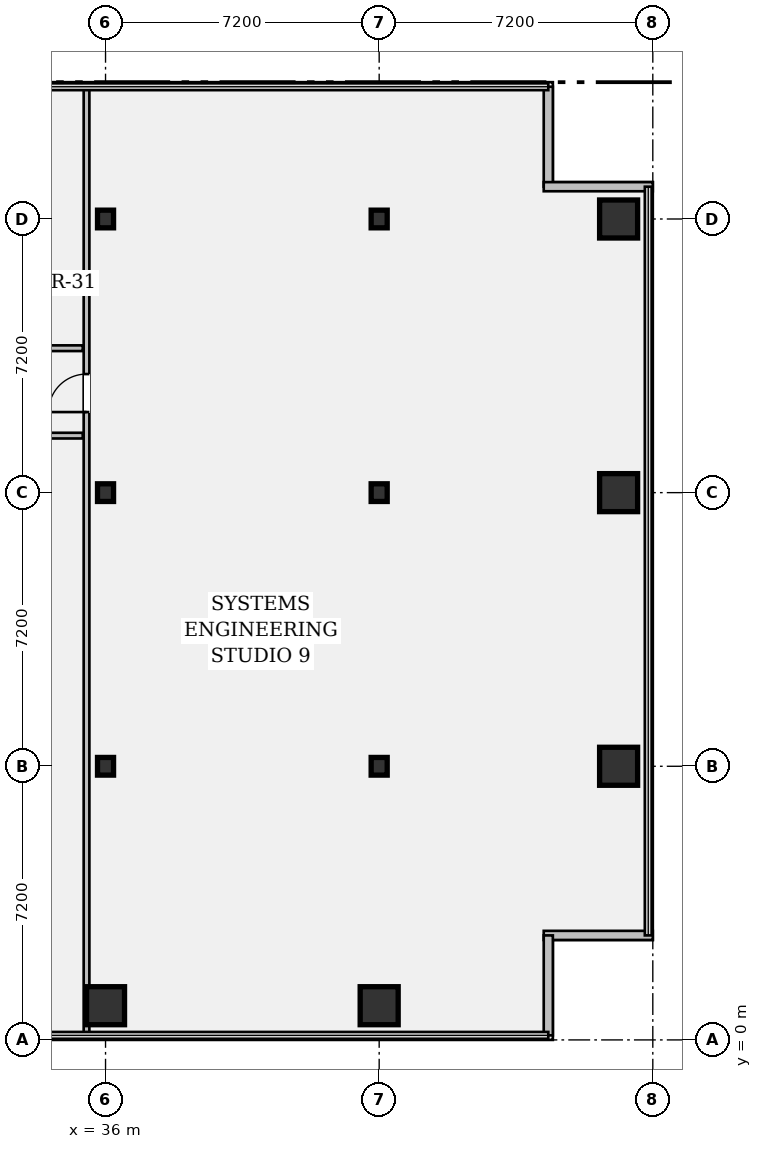
"""IFC4 building model, lengths in metres.
Left out: names, types, materials, properties, quantities, classifications, styles, units other than length and angle.
Written with IfcOpenShell. Run it as: python <this file> out.ifc"""

import sys

from ifc_helpers import new_model, si_unit, direction, frame, frame_2d, origin, origin_2d, place, context, subcontext, project, spatial, rectangle, hollow_rectangle, i_section, extrude, element, fill, save


model = new_model("IFC4")
c1 = context("Model", 3, precision=1e-05, world=origin(), true_north=direction((0.0, 1.0)))
c2 = subcontext(c1, "Body", "Model", "MODEL_VIEW")
j1 = project(units=[si_unit("LENGTHUNIT", "METRE"), si_unit("PLANEANGLEUNIT", "RADIAN")], contexts=[c1])
p1 = place(None, origin())
s1 = spatial("IfcSite", under=j1, at=p1, CompositionType="ELEMENT")
p2 = place(p1, origin())
s2 = spatial("IfcBuilding", under=s1, at=p2, CompositionType="ELEMENT")
p3 = place(p2, frame((0.0, 0.0, 46.55)))
s3 = spatial("IfcBuildingStorey", under=s2, at=p3, CompositionType="ELEMENT", Elevation=46.55)
p4 = place(p3, frame((36.0, 0.9, 0.0), z_axis=(0.0, 0.0, 1.0), x_axis=(1.0, 0.0, 0.0)))
e1 = element("IfcColumn", 1, at=p4, inside=s3, PredefinedType="COLUMN", context=c2, shape_type="SweptSolid", body=[
    extrude(hollow_rectangle(XDim=1.0, YDim=1.0, WallThickness=0.065, at=origin_2d()), origin(), (0.0, 0.0, 1.0), 3.57),
])
for number, where, z_axis, x_axis in (
    (2, (36.0, 7.2, 0.0), (0.0, 0.0, 1.0), (1.0, 0.0, 0.0)),
    (3, (36.0, 14.4, 0.0), (0.0, 0.0, 1.0), (1.0, 0.0, 0.0)),
    (4, (36.0, 21.6, 0.0), (0.0, 0.0, 1.0), (1.0, 0.0, 0.0)),
):
    element("IfcColumn", number, at=place(p3, frame(where, z_axis=z_axis, x_axis=x_axis)), inside=s3, PredefinedType="COLUMN", context=c2, shape_type="SweptSolid", body=[
        extrude(i_section(OverallWidth=0.422, OverallDepth=0.465, WebThickness=0.045, FlangeThickness=0.073, FilletRadius=0.018, at=origin_2d()), origin(), (0.0, 0.0, 1.0), 3.57),
    ])
p5 = place(p3, frame((43.2, 0.9, 0.0), z_axis=(0.0, 0.0, 1.0), x_axis=(1.0, 0.0, 0.0)))
e5 = element("IfcColumn", 5, at=p5, inside=s3, PredefinedType="COLUMN", context=c2, shape_type="SweptSolid", body=[
    extrude(hollow_rectangle(XDim=1.0, YDim=1.0, WallThickness=0.065, at=origin_2d()), origin(), (0.0, 0.0, 1.0), 3.57),
])
for number, where, z_axis, x_axis in (
    (6, (43.2, 7.2, 0.0), (0.0, 0.0, 1.0), (1.0, 0.0, 0.0)),
    (7, (43.2, 14.4, 0.0), (0.0, 0.0, 1.0), (1.0, 0.0, 0.0)),
    (8, (43.2, 21.6, 0.0), (0.0, 0.0, 1.0), (1.0, 0.0, 0.0)),
):
    element("IfcColumn", number, at=place(p3, frame(where, z_axis=z_axis, x_axis=x_axis)), inside=s3, PredefinedType="COLUMN", context=c2, shape_type="SweptSolid", body=[
        extrude(i_section(OverallWidth=0.422, OverallDepth=0.465, WebThickness=0.045, FlangeThickness=0.073, FilletRadius=0.018, at=origin_2d()), origin(), (0.0, 0.0, 1.0), 3.57),
    ])
for number, where, z_axis, x_axis in (
    (9, (49.5, 7.2, 0.0), (0.0, 0.0, 1.0), (1.0, 0.0, 0.0)),
    (10, (49.5, 14.4, 0.0), (0.0, 0.0, 1.0), (1.0, 0.0, 0.0)),
    (11, (49.5, 21.6, 0.0), (0.0, 0.0, 1.0), (1.0, 0.0, 0.0)),
):
    element("IfcColumn", number, at=place(p3, frame(where, z_axis=z_axis, x_axis=x_axis)), inside=s3, PredefinedType="COLUMN", context=c2, shape_type="SweptSolid", body=[
        extrude(hollow_rectangle(XDim=1.0, YDim=1.0, WallThickness=0.065, at=origin_2d()), origin(), (0.0, 0.0, 1.0), 3.57),
    ])
p6 = place(p3, frame((47.65, 25.08, 0.0), z_axis=(0.0, 0.0, 1.0), x_axis=(0.0, -1.0, 0.0)))
e12 = element("IfcWall", 12, at=p6, inside=s3, PredefinedType="STANDARD", context=c2, shape_type="SweptSolid", body=[
    extrude(rectangle(XDim=2.63, YDim=0.24, at=frame_2d((1.315, 0.0))), origin(), (0.0, 0.0, 1.0), 3.57),
])
for number, where, z_axis, x_axis in (
    (13, (47.53, 22.45, 0.0), (0.0, 0.0, 1.0), (1.0, 0.0, 0.0)),
    (14, (50.4, 2.75, 0.0), (0.0, 0.0, 1.0), (-1.0, 0.0, 0.0)),
):
    element("IfcWall", number, at=place(p3, frame(where, z_axis=z_axis, x_axis=x_axis)), inside=s3, PredefinedType="STANDARD", context=c2, shape_type="SweptSolid", body=[
        extrude(rectangle(XDim=2.87, YDim=0.24, at=frame_2d((1.435, 0.0))), origin(), (0.0, 0.0, 1.0), 3.57),
    ])
p7 = place(p3, frame((47.65, 2.75, 0.0), z_axis=(0.0, 0.0, 1.0), x_axis=(0.0, -1.0, 0.0)))
e15 = element("IfcWall", 15, at=p7, inside=s3, PredefinedType="STANDARD", context=c2, shape_type="SweptSolid", body=[
    extrude(rectangle(XDim=2.63, YDim=0.24, at=frame_2d((1.315, 0.0))), origin(), (0.0, 0.0, 1.0), 3.57),
])
p8 = place(p3, frame((17.35, 15.9, 0.0), z_axis=(0.0, 0.0, 1.0), x_axis=(1.0, 0.0, 0.0)))
e16 = element("IfcWall", 16, at=p8, inside=s3, PredefinedType="PARTITIONING", context=c2, shape_type="SweptSolid", body=[
    extrude(rectangle(XDim=18.05, YDim=0.15, at=frame_2d((9.025, 0.0))), origin(), (0.0, 0.0, 1.0), 2.699),
])
p9 = place(p8, frame((2.82, 0.0, 0.0)))
e17 = element("IfcOpeningElement", 17, at=p9, cuts=e16, PredefinedType="OPENING", context=c2, shape_type="SweptSolid", body=[
    extrude(rectangle(XDim=0.95, YDim=2.15, at=frame_2d((0.475, 1.075))), frame((0.0, 0.087, 0.0), z_axis=(0.0, -1.0, 0.0), x_axis=(1.0, 0.0, 0.0)), (0.0, 0.0, 1.0), 0.174),
])
p10 = place(p8, frame((9.75, 0.0, 0.0)))
e18 = element("IfcOpeningElement", 18, at=p10, cuts=e16, PredefinedType="OPENING", context=c2, shape_type="SweptSolid", body=[
    extrude(rectangle(XDim=0.95, YDim=2.15, at=frame_2d((0.475, 1.075))), frame((0.0, 0.087, 0.0), z_axis=(0.0, -1.0, 0.0), x_axis=(1.0, 0.0, 0.0)), (0.0, 0.0, 1.0), 0.174),
])
p11 = place(p8, frame((15.45, 0.0, 0.0)))
e19 = element("IfcOpeningElement", 19, at=p11, cuts=e16, PredefinedType="OPENING", context=c2, shape_type="SweptSolid", body=[
    extrude(rectangle(XDim=0.95, YDim=2.15, at=frame_2d((0.475, 1.075))), frame((0.0, 0.087, 0.0), z_axis=(0.0, -1.0, 0.0), x_axis=(1.0, 0.0, 0.0)), (0.0, 0.0, 1.0), 0.174),
])
p12 = place(p3, frame((17.35, 18.2, 0.0), z_axis=(0.0, 0.0, 1.0), x_axis=(1.0, 0.0, 0.0)))
e20 = element("IfcWall", 20, at=p12, inside=s3, PredefinedType="PARTITIONING", context=c2, shape_type="SweptSolid", body=[
    extrude(rectangle(XDim=18.05, YDim=0.15, at=frame_2d((9.025, 0.0))), origin(), (0.0, 0.0, 1.0), 2.699),
])
p13 = place(p12, frame((0.7, 0.0, 0.0)))
e21 = element("IfcOpeningElement", 21, at=p13, cuts=e20, PredefinedType="OPENING", context=c2, shape_type="SweptSolid", body=[
    extrude(rectangle(XDim=0.85, YDim=2.15, at=frame_2d((0.425, 1.075))), frame((0.0, 0.087, 0.0), z_axis=(0.0, -1.0, 0.0), x_axis=(1.0, 0.0, 0.0)), (0.0, 0.0, 1.0), 0.174),
])
p14 = place(p12, frame((3.95, 0.0, 0.0)))
e22 = element("IfcOpeningElement", 22, at=p14, cuts=e20, PredefinedType="OPENING", context=c2, shape_type="SweptSolid", body=[
    extrude(rectangle(XDim=0.85, YDim=2.15, at=frame_2d((0.425, 1.075))), frame((0.0, 0.087, 0.0), z_axis=(0.0, -1.0, 0.0), x_axis=(1.0, 0.0, 0.0)), (0.0, 0.0, 1.0), 0.174),
])
p15 = place(p12, frame((6.46, 0.0, 0.0)))
e23 = element("IfcOpeningElement", 23, at=p15, cuts=e20, PredefinedType="OPENING", context=c2, shape_type="SweptSolid", body=[
    extrude(rectangle(XDim=0.85, YDim=2.15, at=frame_2d((0.425, 1.075))), frame((0.0, 0.087, 0.0), z_axis=(0.0, -1.0, 0.0), x_axis=(1.0, 0.0, 0.0)), (0.0, 0.0, 1.0), 0.174),
])
p16 = place(p12, frame((9.5, 0.0, 0.0)))
e24 = element("IfcOpeningElement", 24, at=p16, cuts=e20, PredefinedType="OPENING", context=c2, shape_type="SweptSolid", body=[
    extrude(rectangle(XDim=0.95, YDim=2.15, at=frame_2d((0.475, 1.075))), frame((0.0, 0.087, 0.0), z_axis=(0.0, -1.0, 0.0), x_axis=(1.0, 0.0, 0.0)), (0.0, 0.0, 1.0), 0.174),
])
p17 = place(p3, frame((35.5, 0.12, 0.0), z_axis=(0.0, 0.0, 1.0), x_axis=(0.0, 1.0, 0.0)))
e25 = element("IfcWall", 25, at=p17, inside=s3, PredefinedType="PARTITIONING", context=c2, shape_type="SweptSolid", body=[
    extrude(rectangle(XDim=24.96, YDim=0.15, at=frame_2d((12.48, 0.0))), origin(), (0.0, 0.0, 1.0), 2.699),
])
p18 = place(p17, frame((16.4, 0.0, 0.0)))
e26 = element("IfcOpeningElement", 26, at=p18, cuts=e25, PredefinedType="OPENING", context=c2, shape_type="SweptSolid", body=[
    extrude(rectangle(XDim=1.0, YDim=2.15, at=frame_2d((0.5, 1.075))), frame((0.0, 0.087, 0.0), z_axis=(0.0, -1.0, 0.0), x_axis=(1.0, 0.0, 0.0)), (0.0, 0.0, 1.0), 0.174),
])
p19 = place(p18, origin())
e27 = element("IfcDoor", 27, at=p19, inside=s3, OperationType="SINGLE_SWING_LEFT", PredefinedType="DOOR", context=c2, shape_type="SweptSolid", body=[
    extrude(rectangle(XDim=1.0, YDim=2.15, at=frame_2d((0.5, 1.075))), frame((0.0, 0.025, 0.0), z_axis=(0.0, -1.0, 0.0), x_axis=(1.0, 0.0, 0.0)), (0.0, 0.0, 1.0), 0.05),
])
fill(e26, e27)
save(model, sys.argv[1])
